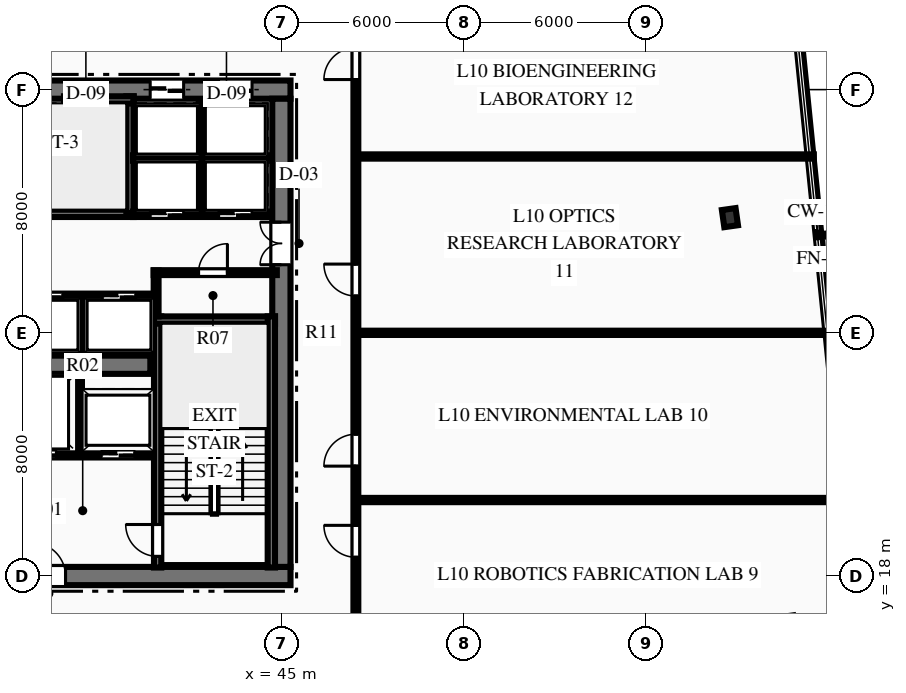
"""IFC4 building model, lengths in metres.
Left out: names, types, materials, properties, quantities, classifications, styles, units other than length and angle.
Written with IfcOpenShell. Run it as: python <this file> out.ifc"""

import sys

from ifc_helpers import new_model, si_unit, direction, frame, frame_2d, origin, origin_2d, place, context, subcontext, project, spatial, rectangle, i_section, extrude, element, fill, save


model = new_model("IFC4")
c1 = context("Model", 3, precision=1e-05, world=origin(), true_north=direction((0.0, 1.0)))
c2 = subcontext(c1, "Body", "Model", "MODEL_VIEW")
j1 = project(units=[si_unit("LENGTHUNIT", "METRE"), si_unit("PLANEANGLEUNIT", "RADIAN")], contexts=[c1])
p1 = place(None, origin())
s1 = spatial("IfcSite", under=j1, at=p1, CompositionType="ELEMENT")
p2 = place(p1, origin())
s2 = spatial("IfcBuilding", under=s1, at=p2, CompositionType="ELEMENT")
p3 = place(p2, frame((0.0, 0.0, 47.7)))
s3 = spatial("IfcBuildingStorey", under=s2, at=p3, CompositionType="ELEMENT", Elevation=47.7)
p4 = place(p3, frame((26.7, 18.0, 0.0), z_axis=(0.0, 0.0, 1.0), x_axis=(1.0, 0.0, 0.0)))
e1 = element("IfcWall", 1, at=p4, inside=s3, PredefinedType="SHEAR", context=c2, shape_type="SweptSolid", body=[
    extrude(rectangle(XDim=18.6, YDim=0.6, at=frame_2d((9.3, 0.0))), origin(), (0.0, 0.0, 1.0), 3.75),
])
p5 = place(p4, frame((7.4, 0.0, 0.0)))
e2 = element("IfcOpeningElement", 2, at=p5, cuts=e1, PredefinedType="OPENING", context=c2, shape_type="SweptSolid", body=[
    extrude(rectangle(XDim=1.1, YDim=2.15, at=frame_2d((0.55, 1.075))), frame((0.0, 0.31, 0.0), z_axis=(0.0, -1.0, 0.0), x_axis=(1.0, 0.0, 0.0)), (0.0, 0.0, 1.0), 0.62),
])
p6 = place(p4, frame((10.1, 0.0, 0.0)))
e3 = element("IfcOpeningElement", 3, at=p6, cuts=e1, PredefinedType="OPENING", context=c2, shape_type="SweptSolid", body=[
    extrude(rectangle(XDim=1.1, YDim=2.15, at=frame_2d((0.55, 1.075))), frame((0.0, 0.31, 0.0), z_axis=(0.0, -1.0, 0.0), x_axis=(1.0, 0.0, 0.0)), (0.0, 0.0, 1.0), 0.62),
])
p7 = place(p3, frame((26.7, 34.0, 0.0), z_axis=(0.0, 0.0, 1.0), x_axis=(1.0, 0.0, 0.0)))
e4 = element("IfcWall", 4, at=p7, inside=s3, PredefinedType="SHEAR", context=c2, shape_type="SweptSolid", body=[
    extrude(rectangle(XDim=18.6, YDim=0.6, at=frame_2d((9.3, 0.0))), origin(), (0.0, 0.0, 1.0), 3.75),
])
p8 = place(p7, frame((1.265, 0.0, 0.0)))
e5 = element("IfcOpeningElement", 5, at=p8, cuts=e4, PredefinedType="OPENING", context=c2, shape_type="SweptSolid", body=[
    extrude(rectangle(XDim=1.1, YDim=2.15, at=frame_2d((0.55, 1.075))), frame((0.0, 0.31, 0.0), z_axis=(0.0, -1.0, 0.0), x_axis=(1.0, 0.0, 0.0)), (0.0, 0.0, 1.0), 0.62),
])
p9 = place(p7, frame((3.515, 0.0, 0.0)))
e6 = element("IfcOpeningElement", 6, at=p9, cuts=e4, PredefinedType="OPENING", context=c2, shape_type="SweptSolid", body=[
    extrude(rectangle(XDim=1.1, YDim=2.15, at=frame_2d((0.55, 1.075))), frame((0.0, 0.31, 0.0), z_axis=(0.0, -1.0, 0.0), x_axis=(1.0, 0.0, 0.0)), (0.0, 0.0, 1.0), 0.62),
])
p10 = place(p7, frame((13.985, 0.0, 0.0)))
e7 = element("IfcOpeningElement", 7, at=p10, cuts=e4, PredefinedType="OPENING", context=c2, shape_type="SweptSolid", body=[
    extrude(rectangle(XDim=1.1, YDim=2.15, at=frame_2d((0.55, 1.075))), frame((0.0, 0.31, 0.0), z_axis=(0.0, -1.0, 0.0), x_axis=(1.0, 0.0, 0.0)), (0.0, 0.0, 1.0), 0.62),
])
p11 = place(p7, frame((16.235, 0.0, 0.0)))
e8 = element("IfcOpeningElement", 8, at=p11, cuts=e4, PredefinedType="OPENING", context=c2, shape_type="SweptSolid", body=[
    extrude(rectangle(XDim=1.1, YDim=2.15, at=frame_2d((0.55, 1.075))), frame((0.0, 0.31, 0.0), z_axis=(0.0, -1.0, 0.0), x_axis=(1.0, 0.0, 0.0)), (0.0, 0.0, 1.0), 0.62),
])
p12 = place(p3, frame((45.0, 18.3, 0.0), z_axis=(0.0, 0.0, 1.0), x_axis=(0.0, 1.0, 0.0)))
e9 = element("IfcWall", 9, at=p12, inside=s3, PredefinedType="SHEAR", context=c2, shape_type="SweptSolid", body=[
    extrude(rectangle(XDim=15.4, YDim=0.6, at=frame_2d((7.7, 0.0))), origin(), (0.0, 0.0, 1.0), 3.75),
])
p13 = place(p12, frame((9.94, 0.0, 0.0)))
e10 = element("IfcOpeningElement", 10, at=p13, cuts=e9, PredefinedType="OPENING", context=c2, shape_type="SweptSolid", body=[
    extrude(rectangle(XDim=1.4, YDim=2.2, at=frame_2d((0.7, 1.1))), frame((0.0, 0.31, 0.0), z_axis=(0.0, -1.0, 0.0), x_axis=(1.0, 0.0, 0.0)), (0.0, 0.0, 1.0), 0.62),
])
p14 = place(p3, frame((31.31, 24.95, 0.0), z_axis=(0.0, 0.0, 1.0), x_axis=(1.0, 0.0, 0.0)))
e11 = element("IfcWall", 11, at=p14, inside=s3, PredefinedType="SHEAR", context=c2, shape_type="SweptSolid", body=[
    extrude(rectangle(XDim=9.38, YDim=0.6, at=frame_2d((4.69, 0.0))), origin(), (0.0, 0.0, 1.0), 3.75),
])
p15 = place(p3, frame((40.93, 18.28, 0.0), z_axis=(0.0, 0.0, 1.0), x_axis=(0.0, 1.0, 0.0)))
e12 = element("IfcWall", 12, at=p15, inside=s3, PredefinedType="SHEAR", context=c2, shape_type="SweptSolid", body=[
    extrude(rectangle(XDim=8.26, YDim=0.24, at=frame_2d((4.13, 0.0))), origin(), (0.0, 0.0, 1.0), 3.75),
])
p16 = place(p15, frame((0.365, 0.0, 0.0)))
e13 = element("IfcOpeningElement", 13, at=p16, cuts=e12, PredefinedType="OPENING", context=c2, shape_type="SweptSolid", body=[
    extrude(rectangle(XDim=1.05, YDim=2.15, at=frame_2d((0.525, 1.075))), frame((0.0, 0.13, 0.0), z_axis=(0.0, -1.0, 0.0), x_axis=(1.0, 0.0, 0.0)), (0.0, 0.0, 1.0), 0.26),
])
p17 = place(p3, frame((40.81, 26.42, 0.0), z_axis=(0.0, 0.0, 1.0), x_axis=(1.0, 0.0, 0.0)))
e14 = element("IfcWall", 14, at=p17, inside=s3, PredefinedType="SHEAR", context=c2, shape_type="SweptSolid", body=[
    extrude(rectangle(XDim=3.98, YDim=0.24, at=frame_2d((1.99, 0.0))), origin(), (0.0, 0.0, 1.0), 3.75),
])
p18 = place(p3, frame((44.67, 18.28, 0.0), z_axis=(0.0, 0.0, 1.0), x_axis=(0.0, 1.0, 0.0)))
e15 = element("IfcWall", 15, at=p18, inside=s3, PredefinedType="SHEAR", context=c2, shape_type="SweptSolid", body=[
    extrude(rectangle(XDim=8.26, YDim=0.24, at=frame_2d((4.13, 0.0))), origin(), (0.0, 0.0, 1.0), 3.75),
])
p19 = place(p3, frame((31.76, 29.93, 0.0), z_axis=(0.0, 0.0, 1.0), x_axis=(1.0, 0.0, 0.0)))
e16 = element("IfcWall", 16, at=p19, inside=s3, PredefinedType="SHEAR", context=c2, shape_type="SweptSolid", body=[
    extrude(rectangle(XDim=8.38, YDim=0.24, at=frame_2d((4.19, 0.0))), origin(), (0.0, 0.0, 1.0), 3.75),
])
p20 = place(p19, frame((0.565, 0.0, 0.0)))
e17 = element("IfcOpeningElement", 17, at=p20, cuts=e16, PredefinedType="OPENING", context=c2, shape_type="SweptSolid", body=[
    extrude(rectangle(XDim=1.05, YDim=2.15, at=frame_2d((0.525, 1.075))), frame((0.0, 0.13, 0.0), z_axis=(0.0, -1.0, 0.0), x_axis=(1.0, 0.0, 0.0)), (0.0, 0.0, 1.0), 0.26),
])
p21 = place(p3, frame((40.02, 29.93, 0.0), z_axis=(0.0, 0.0, 1.0), x_axis=(0.0, 1.0, 0.0)))
e18 = element("IfcWall", 18, at=p21, inside=s3, PredefinedType="SHEAR", context=c2, shape_type="SweptSolid", body=[
    extrude(rectangle(XDim=3.85, YDim=0.24, at=frame_2d((1.925, 0.0))), origin(), (0.0, 0.0, 1.0), 3.75),
])
p22 = place(p3, frame((37.85, 33.66, 0.0), z_axis=(0.0, 0.0, 1.0), x_axis=(1.0, 0.0, 0.0)))
e19 = element("IfcWall", 19, at=p22, inside=s3, PredefinedType="SHEAR", context=c2, shape_type="SweptSolid", body=[
    extrude(rectangle(XDim=2.29, YDim=0.24, at=frame_2d((1.145, 0.0))), origin(), (0.0, 0.0, 1.0), 3.75),
])
p23 = place(p3, frame((59.753, 29.789, 0.0), z_axis=(0.0, 0.0, 1.0), x_axis=(0.990146240249, 0.140037219771, 0.0)))
e20 = element("IfcColumn", 20, at=p23, inside=s3, PredefinedType="COLUMN", context=c2, shape_type="SweptSolid", body=[
    extrude(i_section(OverallWidth=0.454, OverallDepth=0.569, WebThickness=0.078, FlangeThickness=0.125, at=origin_2d()), origin(), (0.0, 0.0, 1.0), 3.75),
])
p24 = place(p3, frame((36.12, 22.0, 0.0), z_axis=(0.0, 0.0, 1.0), x_axis=(1.0, 0.0, 0.0)))
e21 = element("IfcWall", 21, at=p24, inside=s3, PredefinedType="PARTITIONING", context=c2, shape_type="SweptSolid", body=[
    extrude(rectangle(XDim=4.69, YDim=0.2, at=frame_2d((2.345, 0.0))), origin(), (0.0, 0.0, 1.0), 3.44),
])
p25 = place(p24, frame((2.955, 0.0, 0.0)))
e22 = element("IfcOpeningElement", 22, at=p25, cuts=e21, PredefinedType="OPENING", context=c2, shape_type="SweptSolid", body=[
    extrude(rectangle(XDim=1.1, YDim=2.15, at=frame_2d((0.55, 1.075))), frame((0.0, 0.11, 0.0), z_axis=(0.0, -1.0, 0.0), x_axis=(1.0, 0.0, 0.0)), (0.0, 0.0, 1.0), 0.22),
])
p26 = place(p24, frame((0.08, 0.0, 0.0)))
e23 = element("IfcOpeningElement", 23, at=p26, cuts=e21, PredefinedType="OPENING", context=c2, shape_type="SweptSolid", body=[
    extrude(rectangle(XDim=1.4, YDim=2.2, at=frame_2d((0.7, 1.1))), frame((0.0, 0.11, 0.0), z_axis=(0.0, -1.0, 0.0), x_axis=(1.0, 0.0, 0.0)), (0.0, 0.0, 1.0), 0.22),
])
p27 = place(p3, frame((38.35, 22.05, 0.0), z_axis=(0.0, 0.0, 1.0), x_axis=(0.0, 1.0, 0.0)))
e24 = element("IfcWall", 24, at=p27, inside=s3, PredefinedType="PARTITIONING", context=c2, shape_type="SweptSolid", body=[
    extrude(rectangle(XDim=2.6, YDim=0.18, at=frame_2d((1.3, 0.0))), origin(), (0.0, 0.0, 1.0), 3.44),
])
p28 = place(p3, frame((40.8, 27.98, 0.0), z_axis=(0.0, 0.0, 1.0), x_axis=(1.0, 0.0, 0.0)))
e25 = element("IfcWall", 25, at=p28, inside=s3, PredefinedType="PARTITIONING", context=c2, shape_type="SweptSolid", body=[
    extrude(rectangle(XDim=4.05, YDim=0.16, at=frame_2d((2.025, 0.0))), origin(), (0.0, 0.0, 1.0), 3.44),
])
p29 = place(p28, frame((1.475, 0.0, 0.0)))
e26 = element("IfcOpeningElement", 26, at=p29, cuts=e25, PredefinedType="OPENING", context=c2, shape_type="SweptSolid", body=[
    extrude(rectangle(XDim=0.95, YDim=2.15, at=frame_2d((0.475, 1.075))), frame((0.0, 0.09, 0.0), z_axis=(0.0, -1.0, 0.0), x_axis=(1.0, 0.0, 0.0)), (0.0, 0.0, 1.0), 0.18),
])
p30 = place(p3, frame((40.88, 26.54, 0.0), z_axis=(0.0, 0.0, 1.0), x_axis=(0.0, 1.0, 0.0)))
e27 = element("IfcWall", 27, at=p30, inside=s3, PredefinedType="PARTITIONING", context=c2, shape_type="SweptSolid", body=[
    extrude(rectangle(XDim=1.51, YDim=0.16, at=frame_2d((0.755, 0.0))), origin(), (0.0, 0.0, 1.0), 3.44),
])
p31 = place(p3, frame((40.12, 29.9, 0.0), z_axis=(0.0, 0.0, 1.0), x_axis=(1.0, 0.0, 0.0)))
e28 = element("IfcWall", 28, at=p31, inside=s3, PredefinedType="PARTITIONING", context=c2, shape_type="SweptSolid", body=[
    extrude(rectangle(XDim=4.43, YDim=0.18, at=frame_2d((2.215, 0.0))), origin(), (0.0, 0.0, 1.0), 3.44),
])
p32 = place(p31, frame((0.565, 0.0, 0.0)))
e29 = element("IfcOpeningElement", 29, at=p32, cuts=e28, PredefinedType="OPENING", context=c2, shape_type="SweptSolid", body=[
    extrude(rectangle(XDim=1.1, YDim=2.15, at=frame_2d((0.55, 1.075))), frame((0.0, 0.1, 0.0), z_axis=(0.0, -1.0, 0.0), x_axis=(1.0, 0.0, 0.0)), (0.0, 0.0, 1.0), 0.2),
])
p33 = place(p31, frame((2.815, 0.0, 0.0)))
e30 = element("IfcOpeningElement", 30, at=p33, cuts=e28, PredefinedType="OPENING", context=c2, shape_type="SweptSolid", body=[
    extrude(rectangle(XDim=1.1, YDim=2.15, at=frame_2d((0.55, 1.075))), frame((0.0, 0.1, 0.0), z_axis=(0.0, -1.0, 0.0), x_axis=(1.0, 0.0, 0.0)), (0.0, 0.0, 1.0), 0.2),
])
p34 = place(p3, frame((40.12, 31.75, 0.0), z_axis=(0.0, 0.0, 1.0), x_axis=(1.0, 0.0, 0.0)))
e31 = element("IfcWall", 31, at=p34, inside=s3, PredefinedType="PARTITIONING", context=c2, shape_type="SweptSolid", body=[
    extrude(rectangle(XDim=4.43, YDim=0.18, at=frame_2d((2.215, 0.0))), origin(), (0.0, 0.0, 1.0), 3.44),
])
p35 = place(p3, frame((42.37, 29.9, 0.0), z_axis=(0.0, 0.0, 1.0), x_axis=(0.0, 1.0, 0.0)))
e32 = element("IfcWall", 32, at=p35, inside=s3, PredefinedType="PARTITIONING", context=c2, shape_type="SweptSolid", body=[
    extrude(rectangle(XDim=3.75, YDim=0.18, at=frame_2d((1.875, 0.0))), origin(), (0.0, 0.0, 1.0), 3.44),
])
p36 = place(p3, frame((31.2, 27.2, 0.0), z_axis=(0.0, 0.0, 1.0), x_axis=(1.0, 0.0, 0.0)))
e33 = element("IfcWall", 33, at=p36, inside=s3, PredefinedType="PARTITIONING", context=c2, shape_type="SweptSolid", body=[
    extrude(rectangle(XDim=9.6, YDim=0.18, at=frame_2d((4.8, 0.0))), origin(), (0.0, 0.0, 1.0), 3.44),
])
p37 = place(p36, frame((0.59, 0.0, 0.0)))
e34 = element("IfcOpeningElement", 34, at=p37, cuts=e33, PredefinedType="OPENING", context=c2, shape_type="SweptSolid", body=[
    extrude(rectangle(XDim=1.1, YDim=2.15, at=frame_2d((0.55, 1.075))), frame((0.0, 0.1, 0.0), z_axis=(0.0, -1.0, 0.0), x_axis=(1.0, 0.0, 0.0)), (0.0, 0.0, 1.0), 0.2),
])
p38 = place(p36, frame((2.99, 0.0, 0.0)))
e35 = element("IfcOpeningElement", 35, at=p38, cuts=e33, PredefinedType="OPENING", context=c2, shape_type="SweptSolid", body=[
    extrude(rectangle(XDim=1.1, YDim=2.15, at=frame_2d((0.55, 1.075))), frame((0.0, 0.1, 0.0), z_axis=(0.0, -1.0, 0.0), x_axis=(1.0, 0.0, 0.0)), (0.0, 0.0, 1.0), 0.2),
])
p39 = place(p36, frame((5.51, 0.0, 0.0)))
e36 = element("IfcOpeningElement", 36, at=p39, cuts=e33, PredefinedType="OPENING", context=c2, shape_type="SweptSolid", body=[
    extrude(rectangle(XDim=1.1, YDim=2.15, at=frame_2d((0.55, 1.075))), frame((0.0, 0.1, 0.0), z_axis=(0.0, -1.0, 0.0), x_axis=(1.0, 0.0, 0.0)), (0.0, 0.0, 1.0), 0.2),
])
p40 = place(p36, frame((7.91, 0.0, 0.0)))
e37 = element("IfcOpeningElement", 37, at=p40, cuts=e33, PredefinedType="OPENING", context=c2, shape_type="SweptSolid", body=[
    extrude(rectangle(XDim=1.1, YDim=2.15, at=frame_2d((0.55, 1.075))), frame((0.0, 0.1, 0.0), z_axis=(0.0, -1.0, 0.0), x_axis=(1.0, 0.0, 0.0)), (0.0, 0.0, 1.0), 0.2),
])
p41 = place(p3, frame((38.46, 25.3, 0.0), z_axis=(0.0, 0.0, 1.0), x_axis=(0.0, 1.0, 0.0)))
e38 = element("IfcWall", 38, at=p41, inside=s3, PredefinedType="PARTITIONING", context=c2, shape_type="SweptSolid", body=[
    extrude(rectangle(XDim=1.9, YDim=0.18, at=frame_2d((0.95, 0.0))), origin(), (0.0, 0.0, 1.0), 3.44),
])
p42 = place(p3, frame((47.45, 15.55, 0.0), z_axis=(0.0, 0.0, 1.0), x_axis=(0.0, 1.0, 0.0)))
e39 = element("IfcWall", 39, at=p42, inside=s3, PredefinedType="PARTITIONING", context=c2, shape_type="SweptSolid", body=[
    extrude(rectangle(XDim=20.9, YDim=0.16, at=frame_2d((10.45, 0.0))), origin(), (0.0, 0.0, 1.0), 3.44),
])
p43 = place(p42, frame((3.067, 0.0, 0.0)))
e40 = element("IfcOpeningElement", 40, at=p43, cuts=e39, PredefinedType="OPENING", context=c2, shape_type="SweptSolid", body=[
    extrude(rectangle(XDim=1.05, YDim=2.15, at=frame_2d((0.525, 1.075))), frame((0.0, 0.09, 0.0), z_axis=(0.0, -1.0, 0.0), x_axis=(1.0, 0.0, 0.0)), (0.0, 0.0, 1.0), 0.18),
])
p44 = place(p42, frame((6.065, 0.0, 0.0)))
e41 = element("IfcOpeningElement", 41, at=p44, cuts=e39, PredefinedType="OPENING", context=c2, shape_type="SweptSolid", body=[
    extrude(rectangle(XDim=1.05, YDim=2.15, at=frame_2d((0.525, 1.075))), frame((0.0, 0.09, 0.0), z_axis=(0.0, -1.0, 0.0), x_axis=(1.0, 0.0, 0.0)), (0.0, 0.0, 1.0), 0.18),
])
p45 = place(p42, frame((11.661, 0.0, 0.0)))
e42 = element("IfcOpeningElement", 42, at=p45, cuts=e39, PredefinedType="OPENING", context=c2, shape_type="SweptSolid", body=[
    extrude(rectangle(XDim=1.05, YDim=2.15, at=frame_2d((0.525, 1.075))), frame((0.0, 0.09, 0.0), z_axis=(0.0, -1.0, 0.0), x_axis=(1.0, 0.0, 0.0)), (0.0, 0.0, 1.0), 0.18),
])
p46 = place(p42, frame((18.781, 0.0, 0.0)))
e43 = element("IfcOpeningElement", 43, at=p46, cuts=e39, PredefinedType="OPENING", context=c2, shape_type="SweptSolid", body=[
    extrude(rectangle(XDim=1.05, YDim=2.15, at=frame_2d((0.525, 1.075))), frame((0.0, 0.09, 0.0), z_axis=(0.0, -1.0, 0.0), x_axis=(1.0, 0.0, 0.0)), (0.0, 0.0, 1.0), 0.18),
])
p47 = place(p3, frame((47.45, 20.5, 0.0), z_axis=(0.0, 0.0, 1.0), x_axis=(1.0, 0.0, 0.0)))
e44 = element("IfcWall", 44, at=p47, inside=s3, PredefinedType="PARTITIONING", context=c2, shape_type="SweptSolid", body=[
    extrude(rectangle(XDim=16.2, YDim=0.14, at=frame_2d((8.1, 0.0))), origin(), (0.0, 0.0, 1.0), 3.44),
])
p48 = place(p3, frame((47.45, 26.0, 0.0), z_axis=(0.0, 0.0, 1.0), x_axis=(1.0, 0.0, 0.0)))
e45 = element("IfcWall", 45, at=p48, inside=s3, PredefinedType="PARTITIONING", context=c2, shape_type="SweptSolid", body=[
    extrude(rectangle(XDim=15.646, YDim=0.14, at=frame_2d((7.823, 0.0))), origin(), (0.0, 0.0, 1.0), 3.44),
])
p49 = place(p3, frame((47.45, 31.8, 0.0), z_axis=(0.0, 0.0, 1.0), x_axis=(1.0, 0.0, 0.0)))
e46 = element("IfcWall", 46, at=p49, inside=s3, PredefinedType="PARTITIONING", context=c2, shape_type="SweptSolid", body=[
    extrude(rectangle(XDim=15.062, YDim=0.14, at=frame_2d((7.531, 0.0))), origin(), (0.0, 0.0, 1.0), 3.44),
])
p50 = place(p29, origin())
e47 = element("IfcDoor", 47, at=p50, inside=s3, OperationType="SINGLE_SWING_RIGHT", PredefinedType="DOOR", context=c2, shape_type="SweptSolid", body=[
    extrude(rectangle(XDim=0.95, YDim=2.15, at=frame_2d((0.475, 1.075))), frame((0.0, 0.025, 0.0), z_axis=(0.0, -1.0, 0.0), x_axis=(1.0, 0.0, 0.0)), (0.0, 0.0, 1.0), 0.05),
])
fill(e26, e47)
p51 = place(p16, origin())
e48 = element("IfcDoor", 48, at=p51, inside=s3, OperationType="SINGLE_SWING_RIGHT", PredefinedType="DOOR", context=c2, shape_type="SweptSolid", body=[
    extrude(rectangle(XDim=1.05, YDim=2.15, at=frame_2d((0.525, 1.075))), frame((0.0, 0.025, 0.0), z_axis=(0.0, -1.0, 0.0), x_axis=(1.0, 0.0, 0.0)), (0.0, 0.0, 1.0), 0.05),
])
fill(e13, e48)
p52 = place(p6, origin())
e49 = element("IfcDoor", 49, at=p52, inside=s3, OperationType="SINGLE_SWING_LEFT", PredefinedType="DOOR", context=c2, shape_type="SweptSolid", body=[
    extrude(rectangle(XDim=1.1, YDim=2.15, at=frame_2d((0.55, 1.075))), frame((0.0, 0.025, 0.0), z_axis=(0.0, -1.0, 0.0), x_axis=(1.0, 0.0, 0.0)), (0.0, 0.0, 1.0), 0.05),
])
fill(e3, e49)
p53 = place(p13, origin())
e50 = element("IfcDoor", 50, at=p53, inside=s3, OperationType="DOUBLE_DOOR_SINGLE_SWING", PredefinedType="DOOR", context=c2, shape_type="SweptSolid", body=[
    extrude(rectangle(XDim=1.4, YDim=2.2, at=frame_2d((0.7, 1.1))), frame((0.0, 0.025, 0.0), z_axis=(0.0, -1.0, 0.0), x_axis=(1.0, 0.0, 0.0)), (0.0, 0.0, 1.0), 0.05),
])
fill(e10, e50)
p54 = place(p43, origin())
e51 = element("IfcDoor", 51, at=p54, inside=s3, OperationType="SINGLE_SWING_RIGHT", PredefinedType="DOOR", context=c2, shape_type="SweptSolid", body=[
    extrude(rectangle(XDim=1.05, YDim=2.15, at=frame_2d((0.525, 1.075))), frame((0.0, 0.025, 0.0), z_axis=(0.0, -1.0, 0.0), x_axis=(1.0, 0.0, 0.0)), (0.0, 0.0, 1.0), 0.05),
])
fill(e40, e51)
p55 = place(p44, origin())
e52 = element("IfcDoor", 52, at=p55, inside=s3, OperationType="SINGLE_SWING_LEFT", PredefinedType="DOOR", context=c2, shape_type="SweptSolid", body=[
    extrude(rectangle(XDim=1.05, YDim=2.15, at=frame_2d((0.525, 1.075))), frame((0.0, 0.025, 0.0), z_axis=(0.0, -1.0, 0.0), x_axis=(1.0, 0.0, 0.0)), (0.0, 0.0, 1.0), 0.05),
])
fill(e41, e52)
p56 = place(p45, origin())
e53 = element("IfcDoor", 53, at=p56, inside=s3, OperationType="SINGLE_SWING_RIGHT", PredefinedType="DOOR", context=c2, shape_type="SweptSolid", body=[
    extrude(rectangle(XDim=1.05, YDim=2.15, at=frame_2d((0.525, 1.075))), frame((0.0, 0.025, 0.0), z_axis=(0.0, -1.0, 0.0), x_axis=(1.0, 0.0, 0.0)), (0.0, 0.0, 1.0), 0.05),
])
fill(e42, e53)
p57 = place(p46, origin())
e54 = element("IfcDoor", 54, at=p57, inside=s3, OperationType="SINGLE_SWING_LEFT", PredefinedType="DOOR", context=c2, shape_type="SweptSolid", body=[
    extrude(rectangle(XDim=1.05, YDim=2.15, at=frame_2d((0.525, 1.075))), frame((0.0, 0.025, 0.0), z_axis=(0.0, -1.0, 0.0), x_axis=(1.0, 0.0, 0.0)), (0.0, 0.0, 1.0), 0.05),
])
fill(e43, e54)
p58 = place(p32, origin())
e55 = element("IfcDoor", 55, at=p58, inside=s3, OperationType="SLIDING_TO_LEFT", PredefinedType="DOOR", context=c2, shape_type="SweptSolid", body=[
    extrude(rectangle(XDim=1.1, YDim=2.15, at=frame_2d((0.55, 1.075))), frame((0.0, 0.025, 0.0), z_axis=(0.0, -1.0, 0.0), x_axis=(1.0, 0.0, 0.0)), (0.0, 0.0, 1.0), 0.05),
])
fill(e29, e55)
p59 = place(p33, origin())
e56 = element("IfcDoor", 56, at=p59, inside=s3, OperationType="SLIDING_TO_LEFT", PredefinedType="DOOR", context=c2, shape_type="SweptSolid", body=[
    extrude(rectangle(XDim=1.1, YDim=2.15, at=frame_2d((0.55, 1.075))), frame((0.0, 0.025, 0.0), z_axis=(0.0, -1.0, 0.0), x_axis=(1.0, 0.0, 0.0)), (0.0, 0.0, 1.0), 0.05),
])
fill(e30, e56)
p60 = place(p10, origin())
e57 = element("IfcDoor", 57, at=p60, inside=s3, OperationType="SLIDING_TO_LEFT", PredefinedType="DOOR", context=c2, shape_type="SweptSolid", body=[
    extrude(rectangle(XDim=1.1, YDim=2.15, at=frame_2d((0.55, 1.075))), frame((0.0, 0.025, 0.0), z_axis=(0.0, -1.0, 0.0), x_axis=(1.0, 0.0, 0.0)), (0.0, 0.0, 1.0), 0.05),
])
fill(e7, e57)
p61 = place(p11, origin())
e58 = element("IfcDoor", 58, at=p61, inside=s3, OperationType="SLIDING_TO_LEFT", PredefinedType="DOOR", context=c2, shape_type="SweptSolid", body=[
    extrude(rectangle(XDim=1.1, YDim=2.15, at=frame_2d((0.55, 1.075))), frame((0.0, 0.025, 0.0), z_axis=(0.0, -1.0, 0.0), x_axis=(1.0, 0.0, 0.0)), (0.0, 0.0, 1.0), 0.05),
])
fill(e8, e58)
p62 = place(p39, origin())
e59 = element("IfcDoor", 59, at=p62, inside=s3, OperationType="SLIDING_TO_LEFT", PredefinedType="DOOR", context=c2, shape_type="SweptSolid", body=[
    extrude(rectangle(XDim=1.1, YDim=2.15, at=frame_2d((0.55, 1.075))), frame((0.0, 0.025, 0.0), z_axis=(0.0, -1.0, 0.0), x_axis=(1.0, 0.0, 0.0)), (0.0, 0.0, 1.0), 0.05),
])
fill(e36, e59)
p63 = place(p40, origin())
e60 = element("IfcDoor", 60, at=p63, inside=s3, OperationType="SLIDING_TO_LEFT", PredefinedType="DOOR", context=c2, shape_type="SweptSolid", body=[
    extrude(rectangle(XDim=1.1, YDim=2.15, at=frame_2d((0.55, 1.075))), frame((0.0, 0.025, 0.0), z_axis=(0.0, -1.0, 0.0), x_axis=(1.0, 0.0, 0.0)), (0.0, 0.0, 1.0), 0.05),
])
fill(e37, e60)
p64 = place(p25, origin())
e61 = element("IfcDoor", 61, at=p64, inside=s3, OperationType="SLIDING_TO_LEFT", PredefinedType="DOOR", context=c2, shape_type="SweptSolid", body=[
    extrude(rectangle(XDim=1.1, YDim=2.15, at=frame_2d((0.55, 1.075))), frame((0.0, 0.025, 0.0), z_axis=(0.0, -1.0, 0.0), x_axis=(1.0, 0.0, 0.0)), (0.0, 0.0, 1.0), 0.05),
])
fill(e22, e61)
p65 = place(p26, origin())
e62 = element("IfcDoor", 62, at=p65, inside=s3, OperationType="SLIDING_TO_LEFT", PredefinedType="DOOR", context=c2, shape_type="SweptSolid", body=[
    extrude(rectangle(XDim=1.4, YDim=2.2, at=frame_2d((0.7, 1.1))), frame((0.0, 0.025, 0.0), z_axis=(0.0, -1.0, 0.0), x_axis=(1.0, 0.0, 0.0)), (0.0, 0.0, 1.0), 0.05),
])
fill(e23, e62)
save(model, sys.argv[1])
